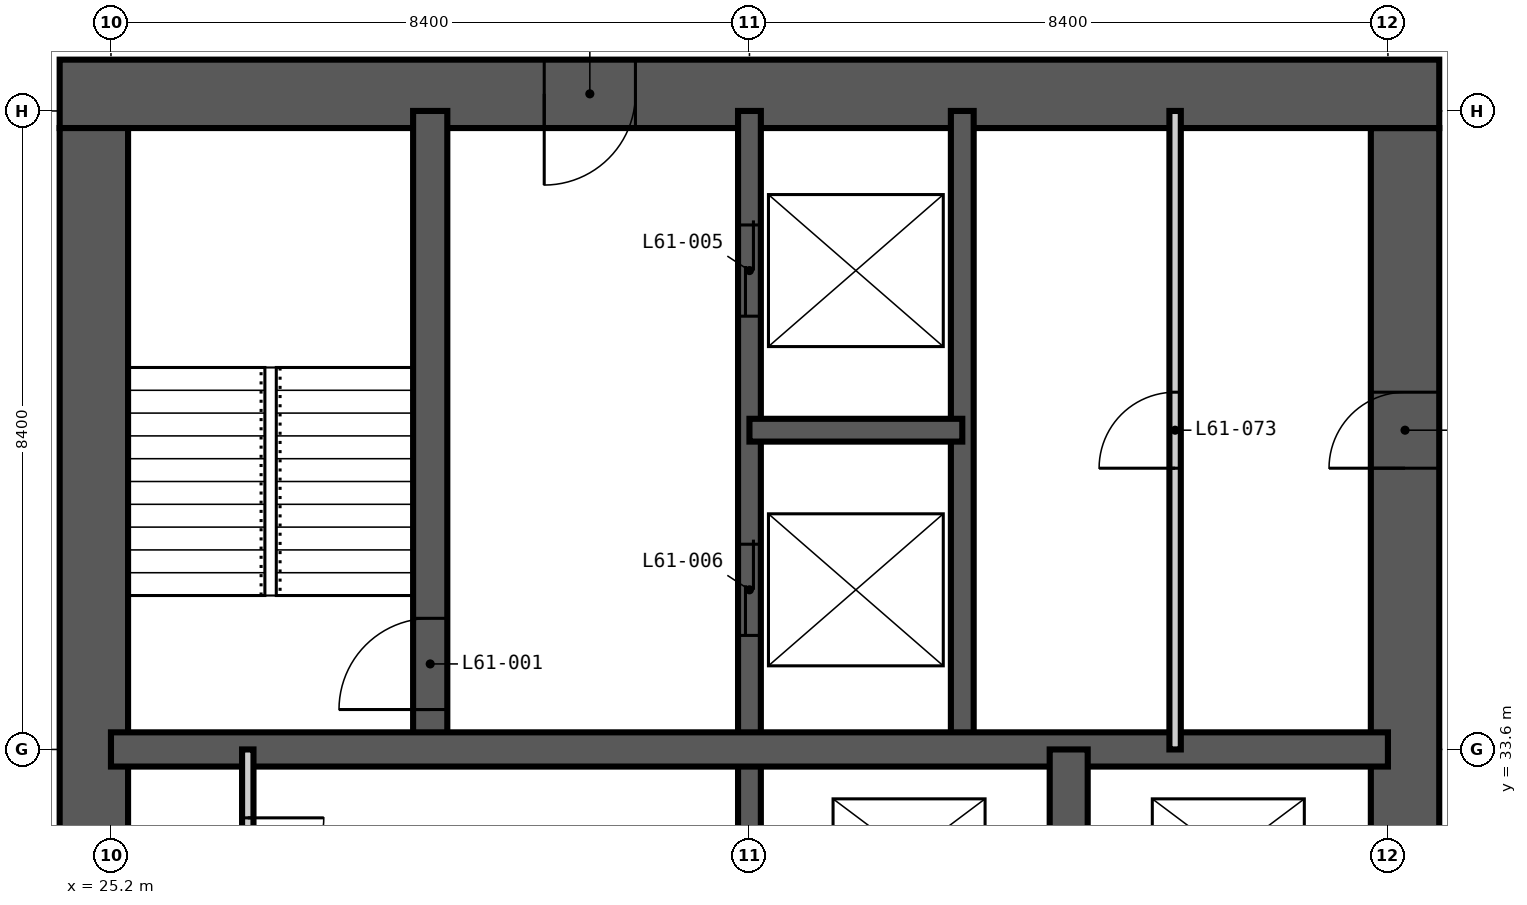
"""IFC4 building model, lengths in metres.
Left out: names, types, materials, properties, quantities, classifications, styles, units other than length and angle.
Written with IfcOpenShell. Run it as: python <this file> out.ifc"""

import sys

from ifc_helpers import new_model, si_unit, direction, frame, frame_2d, origin, place, context, subcontext, project, spatial, rectangle, extrude, element, fill, save


model = new_model("IFC4")
c1 = context("Model", 3, precision=1e-05, world=origin(), true_north=direction((0.0, 1.0)))
c2 = subcontext(c1, "Body", "Model", "MODEL_VIEW")
j1 = project(units=[si_unit("LENGTHUNIT", "METRE"), si_unit("PLANEANGLEUNIT", "RADIAN")], contexts=[c1])
p1 = place(None, origin())
s1 = spatial("IfcSite", under=j1, at=p1, CompositionType="ELEMENT")
p2 = place(p1, origin())
s2 = spatial("IfcBuilding", under=s1, at=p2, CompositionType="ELEMENT")
p3 = place(p2, frame((0.0, 0.0, 237.3)))
s3 = spatial("IfcBuildingStorey", under=s2, at=p3, CompositionType="ELEMENT", Elevation=237.3)
p4 = place(p3, frame((42.225, 17.025, -0.35), z_axis=(0.0, 0.0, 1.0), x_axis=(0.0, 1.0, 0.0)))
e1 = element("IfcWall", 1, at=p4, inside=s3, PredefinedType="SHEAR", context=c2, shape_type="SweptSolid", body=[
    extrude(rectangle(XDim=24.75, YDim=0.9, at=frame_2d((12.375, 0.0))), origin(), (0.0, 0.0, 1.0), 3.9),
])
p5 = place(p4, frame((0.575, 0.0, 0.35)))
e2 = element("IfcOpeningElement", 2, at=p5, cuts=e1, PredefinedType="OPENING", context=c2, shape_type="SweptSolid", body=[
    extrude(rectangle(XDim=1.2, YDim=2.2, at=frame_2d((0.6, 1.1))), frame((0.0, 0.46, 0.0), z_axis=(0.0, -1.0, 0.0), x_axis=(1.0, 0.0, 0.0)), (0.0, 0.0, 1.0), 0.92),
])
p6 = place(p4, frame((11.475, 0.0, 0.35)))
e3 = element("IfcOpeningElement", 3, at=p6, cuts=e1, PredefinedType="OPENING", context=c2, shape_type="SweptSolid", body=[
    extrude(rectangle(XDim=1.8, YDim=2.2, at=frame_2d((0.9, 1.1))), frame((0.0, 0.46, 0.0), z_axis=(0.0, -1.0, 0.0), x_axis=(1.0, 0.0, 0.0)), (0.0, 0.0, 1.0), 0.92),
])
p7 = place(p4, frame((20.275, 0.0, 0.35)))
e4 = element("IfcOpeningElement", 4, at=p7, cuts=e1, PredefinedType="OPENING", context=c2, shape_type="SweptSolid", body=[
    extrude(rectangle(XDim=1.0, YDim=2.1, at=frame_2d((0.5, 1.05))), frame((0.0, 0.46, 0.0), z_axis=(0.0, -1.0, 0.0), x_axis=(1.0, 0.0, 0.0)), (0.0, 0.0, 1.0), 0.92),
])
p8 = place(p3, frame((42.675, 42.225, -0.35), z_axis=(0.0, 0.0, 1.0), x_axis=(-1.0, 0.0, 0.0)))
e5 = element("IfcWall", 5, at=p8, inside=s3, PredefinedType="SHEAR", context=c2, shape_type="SweptSolid", body=[
    extrude(rectangle(XDim=18.15, YDim=0.9, at=frame_2d((9.075, 0.0))), origin(), (0.0, 0.0, 1.0), 3.9),
])
p9 = place(p8, frame((10.575, 0.0, 0.35)))
e6 = element("IfcOpeningElement", 6, at=p9, cuts=e5, PredefinedType="OPENING", context=c2, shape_type="SweptSolid", body=[
    extrude(rectangle(XDim=1.2, YDim=2.2, at=frame_2d((0.6, 1.1))), frame((0.0, 0.46, 0.0), z_axis=(0.0, -1.0, 0.0), x_axis=(1.0, 0.0, 0.0)), (0.0, 0.0, 1.0), 0.92),
])
p10 = place(p3, frame((24.975, 41.775, -0.35), z_axis=(0.0, 0.0, 1.0), x_axis=(0.0, -1.0, 0.0)))
e7 = element("IfcWall", 7, at=p10, inside=s3, PredefinedType="SHEAR", context=c2, shape_type="SweptSolid", body=[
    extrude(rectangle(XDim=24.75, YDim=0.9, at=frame_2d((12.375, 0.0))), origin(), (0.0, 0.0, 1.0), 3.9),
])
p11 = place(p10, frame((11.875, 0.0, 0.35)))
e8 = element("IfcOpeningElement", 8, at=p11, cuts=e7, PredefinedType="OPENING", context=c2, shape_type="SweptSolid", body=[
    extrude(rectangle(XDim=1.0, YDim=2.1, at=frame_2d((0.5, 1.05))), frame((0.0, 0.46, 0.0), z_axis=(0.0, -1.0, 0.0), x_axis=(1.0, 0.0, 0.0)), (0.0, 0.0, 1.0), 0.92),
])
p12 = place(p3, frame((33.6, 16.8, -0.35), z_axis=(0.0, 0.0, 1.0), x_axis=(0.0, 1.0, 0.0)))
e9 = element("IfcWall", 9, at=p12, inside=s3, PredefinedType="SHEAR", context=c2, shape_type="SweptSolid", body=[
    extrude(rectangle(XDim=25.2, YDim=0.3, at=frame_2d((12.6, 0.0))), origin(), (0.0, 0.0, 1.0), 3.9),
])
p13 = place(p12, frame((22.5, 0.0, 0.35)))
e10 = element("IfcOpeningElement", 10, at=p13, cuts=e9, PredefinedType="OPENING", context=c2, shape_type="SweptSolid", body=[
    extrude(rectangle(XDim=1.2, YDim=2.2, at=frame_2d((0.6, 1.1))), frame((0.0, 0.16, 0.0), z_axis=(0.0, -1.0, 0.0), x_axis=(1.0, 0.0, 0.0)), (0.0, 0.0, 1.0), 0.32),
])
p14 = place(p12, frame((18.3, 0.0, 0.35)))
e11 = element("IfcOpeningElement", 11, at=p14, cuts=e9, PredefinedType="OPENING", context=c2, shape_type="SweptSolid", body=[
    extrude(rectangle(XDim=1.2, YDim=2.2, at=frame_2d((0.6, 1.1))), frame((0.0, 0.16, 0.0), z_axis=(0.0, -1.0, 0.0), x_axis=(1.0, 0.0, 0.0)), (0.0, 0.0, 1.0), 0.32),
])
p15 = place(p12, frame((9.3, 0.0, 0.35)))
e12 = element("IfcOpeningElement", 12, at=p15, cuts=e9, PredefinedType="OPENING", context=c2, shape_type="SweptSolid", body=[
    extrude(rectangle(XDim=1.0, YDim=2.1, at=frame_2d((0.5, 1.05))), frame((0.0, 0.16, 0.0), z_axis=(0.0, -1.0, 0.0), x_axis=(1.0, 0.0, 0.0)), (0.0, 0.0, 1.0), 0.32),
])
p16 = place(p3, frame((36.4, 33.6, -0.35), z_axis=(0.0, 0.0, 1.0), x_axis=(0.0, 1.0, 0.0)))
e13 = element("IfcWall", 13, at=p16, inside=s3, PredefinedType="SHEAR", context=c2, shape_type="SweptSolid", body=[
    extrude(rectangle(XDim=8.4, YDim=0.3, at=frame_2d((4.2, 0.0))), origin(), (0.0, 0.0, 1.0), 3.9),
])
p17 = place(p3, frame((33.6, 37.8, -0.35), z_axis=(0.0, 0.0, 1.0), x_axis=(1.0, 0.0, 0.0)))
e14 = element("IfcWall", 14, at=p17, inside=s3, PredefinedType="SHEAR", context=c2, shape_type="SweptSolid", body=[
    extrude(rectangle(XDim=2.8, YDim=0.3, at=frame_2d((1.4, 0.0))), origin(), (0.0, 0.0, 1.0), 3.9),
])
p18 = place(p3, frame((29.4, 33.6, -0.35), z_axis=(0.0, 0.0, 1.0), x_axis=(0.0, 1.0, 0.0)))
e15 = element("IfcWall", 15, at=p18, inside=s3, PredefinedType="SHEAR", context=c2, shape_type="SweptSolid", body=[
    extrude(rectangle(XDim=8.4, YDim=0.45, at=frame_2d((4.2, 0.0))), origin(), (0.0, 0.0, 1.0), 3.9),
])
p19 = place(p18, frame((0.525, 0.0, 0.35)))
e16 = element("IfcOpeningElement", 16, at=p19, cuts=e15, PredefinedType="OPENING", context=c2, shape_type="SweptSolid", body=[
    extrude(rectangle(XDim=1.2, YDim=2.2, at=frame_2d((0.6, 1.1))), frame((0.0, 0.235, 0.0), z_axis=(0.0, -1.0, 0.0), x_axis=(1.0, 0.0, 0.0)), (0.0, 0.0, 1.0), 0.47),
])
p20 = place(p3, frame((25.2, 33.6, -0.35), z_axis=(0.0, 0.0, 1.0), x_axis=(1.0, 0.0, 0.0)))
e17 = element("IfcWall", 17, at=p20, inside=s3, PredefinedType="SHEAR", context=c2, shape_type="SweptSolid", body=[
    extrude(rectangle(XDim=16.8, YDim=0.45, at=frame_2d((8.4, 0.0))), origin(), (0.0, 0.0, 1.0), 3.9),
])
p21 = place(p3, frame((37.8, 30.8, -0.35), z_axis=(0.0, 0.0, 1.0), x_axis=(0.0, 1.0, 0.0)))
e18 = element("IfcWall", 18, at=p21, inside=s3, PredefinedType="SHEAR", context=c2, shape_type="SweptSolid", body=[
    extrude(rectangle(XDim=2.8, YDim=0.5, at=frame_2d((1.4, 0.0))), origin(), (0.0, 0.0, 1.0), 3.9),
])
p22 = place(p3, frame((27.0, 25.2, 0.0), z_axis=(0.0, 0.0, 1.0), x_axis=(0.0, 1.0, 0.0)))
e19 = element("IfcWall", 19, at=p22, inside=s3, PredefinedType="PARTITIONING", context=c2, shape_type="SweptSolid", body=[
    extrude(rectangle(XDim=8.4, YDim=0.15, at=frame_2d((4.2, 0.0))), origin(), (0.0, 0.0, 1.0), 3.55),
])
p23 = place(p22, frame((0.9, 0.0, 0.0)))
e20 = element("IfcOpeningElement", 20, at=p23, cuts=e19, PredefinedType="OPENING", context=c2, shape_type="SweptSolid", body=[
    extrude(rectangle(XDim=1.0, YDim=2.1, at=frame_2d((0.5, 1.05))), frame((0.0, 0.085, 0.0), z_axis=(0.0, -1.0, 0.0), x_axis=(1.0, 0.0, 0.0)), (0.0, 0.0, 1.0), 0.17),
])
p24 = place(p22, frame((3.7, 0.0, 0.0)))
e21 = element("IfcOpeningElement", 21, at=p24, cuts=e19, PredefinedType="OPENING", context=c2, shape_type="SweptSolid", body=[
    extrude(rectangle(XDim=1.0, YDim=2.1, at=frame_2d((0.5, 1.05))), frame((0.0, 0.085, 0.0), z_axis=(0.0, -1.0, 0.0), x_axis=(1.0, 0.0, 0.0)), (0.0, 0.0, 1.0), 0.17),
])
p25 = place(p22, frame((6.5, 0.0, 0.0)))
e22 = element("IfcOpeningElement", 22, at=p25, cuts=e19, PredefinedType="OPENING", context=c2, shape_type="SweptSolid", body=[
    extrude(rectangle(XDim=1.0, YDim=2.1, at=frame_2d((0.5, 1.05))), frame((0.0, 0.085, 0.0), z_axis=(0.0, -1.0, 0.0), x_axis=(1.0, 0.0, 0.0)), (0.0, 0.0, 1.0), 0.17),
])
p26 = place(p3, frame((39.2, 33.6, 0.0), z_axis=(0.0, 0.0, 1.0), x_axis=(0.0, 1.0, 0.0)))
e23 = element("IfcWall", 23, at=p26, inside=s3, PredefinedType="PARTITIONING", context=c2, shape_type="SweptSolid", body=[
    extrude(rectangle(XDim=8.4, YDim=0.15, at=frame_2d((4.2, 0.0))), origin(), (0.0, 0.0, 1.0), 3.55),
])
p27 = place(p26, frame((3.7, 0.0, 0.0)))
e24 = element("IfcOpeningElement", 24, at=p27, cuts=e23, PredefinedType="OPENING", context=c2, shape_type="SweptSolid", body=[
    extrude(rectangle(XDim=1.0, YDim=2.1, at=frame_2d((0.5, 1.05))), frame((0.0, 0.085, 0.0), z_axis=(0.0, -1.0, 0.0), x_axis=(1.0, 0.0, 0.0)), (0.0, 0.0, 1.0), 0.17),
])
p28 = place(p19, origin())
e25 = element("IfcDoor", 25, at=p28, inside=s3, OperationType="SINGLE_SWING_LEFT", PredefinedType="DOOR", context=c2, shape_type="SweptSolid", body=[
    extrude(rectangle(XDim=1.2, YDim=2.2, at=frame_2d((0.6, 1.1))), frame((0.0, 0.025, 0.0), z_axis=(0.0, -1.0, 0.0), x_axis=(1.0, 0.0, 0.0)), (0.0, 0.0, 1.0), 0.05),
])
fill(e16, e25)
p29 = place(p13, origin())
e26 = element("IfcDoor", 26, at=p29, inside=s3, OperationType="DOUBLE_DOOR_SLIDING", PredefinedType="DOOR", context=c2, shape_type="SweptSolid", body=[
    extrude(rectangle(XDim=1.2, YDim=2.2, at=frame_2d((0.6, 1.1))), frame((0.0, 0.025, 0.0), z_axis=(0.0, -1.0, 0.0), x_axis=(1.0, 0.0, 0.0)), (0.0, 0.0, 1.0), 0.05),
])
fill(e10, e26)
p30 = place(p14, origin())
e27 = element("IfcDoor", 27, at=p30, inside=s3, OperationType="DOUBLE_DOOR_SLIDING", PredefinedType="DOOR", context=c2, shape_type="SweptSolid", body=[
    extrude(rectangle(XDim=1.2, YDim=2.2, at=frame_2d((0.6, 1.1))), frame((0.0, 0.025, 0.0), z_axis=(0.0, -1.0, 0.0), x_axis=(1.0, 0.0, 0.0)), (0.0, 0.0, 1.0), 0.05),
])
fill(e11, e27)
p31 = place(p25, frame((1.0, 0.0, 0.0), z_axis=(0.0, 0.0, 1.0), x_axis=(-1.0, 0.0, 0.0)))
e28 = element("IfcDoor", 28, at=p31, inside=s3, OperationType="SINGLE_SWING_LEFT", PredefinedType="DOOR", context=c2, shape_type="SweptSolid", body=[
    extrude(rectangle(XDim=1.0, YDim=2.1, at=frame_2d((0.5, 1.05))), frame((0.0, 0.025, 0.0), z_axis=(0.0, -1.0, 0.0), x_axis=(1.0, 0.0, 0.0)), (0.0, 0.0, 1.0), 0.05),
])
fill(e22, e28)
p32 = place(p9, origin())
e29 = element("IfcDoor", 29, at=p32, inside=s3, OperationType="SINGLE_SWING_RIGHT", PredefinedType="DOOR", context=c2, shape_type="SweptSolid", body=[
    extrude(rectangle(XDim=1.2, YDim=2.2, at=frame_2d((0.6, 1.1))), frame((0.0, 0.025, 0.0), z_axis=(0.0, -1.0, 0.0), x_axis=(1.0, 0.0, 0.0)), (0.0, 0.0, 1.0), 0.05),
])
fill(e6, e29)
p33 = place(p7, origin())
e30 = element("IfcDoor", 30, at=p33, inside=s3, OperationType="SINGLE_SWING_LEFT", PredefinedType="DOOR", context=c2, shape_type="SweptSolid", body=[
    extrude(rectangle(XDim=1.0, YDim=2.1, at=frame_2d((0.5, 1.05))), frame((0.0, 0.025, 0.0), z_axis=(0.0, -1.0, 0.0), x_axis=(1.0, 0.0, 0.0)), (0.0, 0.0, 1.0), 0.05),
])
fill(e4, e30)
p34 = place(p27, origin())
e31 = element("IfcDoor", 31, at=p34, inside=s3, OperationType="SINGLE_SWING_LEFT", PredefinedType="DOOR", context=c2, shape_type="SweptSolid", body=[
    extrude(rectangle(XDim=1.0, YDim=2.1, at=frame_2d((0.5, 1.05))), frame((0.0, 0.025, 0.0), z_axis=(0.0, -1.0, 0.0), x_axis=(1.0, 0.0, 0.0)), (0.0, 0.0, 1.0), 0.05),
])
fill(e24, e31)
save(model, sys.argv[1])
